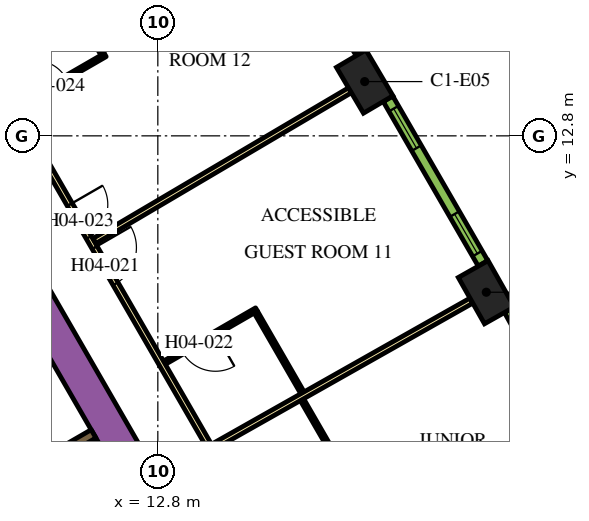
"""IFC4 building model, lengths in metres.
Left out: names, types, materials, properties, quantities, classifications, styles, units other than length and angle.
Written with IfcOpenShell. Run it as: python <this file> out.ifc"""

import sys

from ifc_helpers import new_model, si_unit, direction, frame, frame_2d, origin, origin_2d, place, context, subcontext, project, spatial, rectangle, extrude, element, fill, save


model = new_model("IFC4")
c1 = context("Model", 3, precision=1e-05, world=origin(), true_north=direction((0.0, 1.0)))
c2 = subcontext(c1, "Body", "Model", "MODEL_VIEW")
j1 = project(units=[si_unit("LENGTHUNIT", "METRE"), si_unit("PLANEANGLEUNIT", "RADIAN")], contexts=[c1])
p1 = place(None, origin())
s1 = spatial("IfcSite", under=j1, at=p1, CompositionType="ELEMENT")
p2 = place(p1, origin())
s2 = spatial("IfcBuilding", under=s1, at=p2, CompositionType="ELEMENT")
p3 = place(p2, frame((0.0, 0.0, 66.6)))
s3 = spatial("IfcBuildingStorey", under=s2, at=p3, CompositionType="ELEMENT", Elevation=66.6)
for number, where, z_axis, x_axis in (
    (1, (21.443, 8.685, 0.0), (0.0, 0.0, 1.0), (-0.492, 0.871, 0.0)),
    (2, (18.243, 14.228, 0.0), (0.0, 0.0, 1.0), (-0.508, 0.861, 0.0)),
):
    element("IfcColumn", number, at=place(p3, frame(where, z_axis=z_axis, x_axis=x_axis)), inside=s3, PredefinedType="COLUMN", context=c2, shape_type="SweptSolid", body=[
        extrude(rectangle(XDim=1.4, YDim=0.9, at=origin_2d()), origin(), (0.0, 0.0, 1.0), 3.9),
    ])
p4 = place(p3, frame((6.461, 13.909, 0.0), z_axis=(0.0, 0.0, 1.0), x_axis=(0.500005804227, -0.866022052686, 0.0)))
e3 = element("IfcWall", 3, at=p4, inside=s3, PredefinedType="SOLIDWALL", context=c2, shape_type="SweptSolid", body=[
    extrude(rectangle(XDim=20.834, YDim=0.9, at=frame_2d((10.417, 0.0))), origin(), (0.0, 0.0, 1.0), 3.9),
])
p5 = place(p3, frame((9.204, 3.859, 0.0), z_axis=(0.0, 0.0, 1.0), x_axis=(0.86605622881, 0.499946605688, 0.0)))
e4 = element("IfcWall", 4, at=p5, inside=s3, PredefinedType="SOLIDWALL", context=c2, shape_type="SweptSolid", body=[
    extrude(rectangle(XDim=2.2, YDim=0.25, at=frame_2d((1.1, 0.0))), origin(), (0.0, 0.0, 1.0), 3.9),
])
p6 = place(p3, frame((11.553, -0.46, 0.0), z_axis=(0.0, 0.0, 1.0), x_axis=(-0.500006514828, 0.866021642414, 0.0)))
e5 = element("IfcWall", 5, at=p6, inside=s3, PredefinedType="SOLIDWALL", context=c2, shape_type="SweptSolid", body=[
    extrude(rectangle(XDim=12.35, YDim=0.25, at=frame_2d((6.175, 0.0))), origin(), (0.0, 0.0, 1.0), 3.9),
])
p7 = place(p6, frame((0.585, 0.0, 0.0)))
e6 = element("IfcOpeningElement", 6, at=p7, cuts=e5, PredefinedType="OPENING", context=c2, shape_type="SweptSolid", body=[
    extrude(rectangle(XDim=1.1, YDim=2.1, at=frame_2d((0.55, 1.05))), frame((0.0, 0.135, 0.0), z_axis=(0.0, -1.0, 0.0), x_axis=(1.0, 0.0, 0.0)), (0.0, 0.0, 1.0), 0.27),
])
p8 = place(p6, frame((3.105, 0.0, 0.0)))
e7 = element("IfcOpeningElement", 7, at=p8, cuts=e5, PredefinedType="OPENING", context=c2, shape_type="SweptSolid", body=[
    extrude(rectangle(XDim=1.1, YDim=2.1, at=frame_2d((0.55, 1.05))), frame((0.0, 0.135, 0.0), z_axis=(0.0, -1.0, 0.0), x_axis=(1.0, 0.0, 0.0)), (0.0, 0.0, 1.0), 0.27),
])
p9 = place(p6, frame((5.625, 0.0, 0.0)))
e8 = element("IfcOpeningElement", 8, at=p9, cuts=e5, PredefinedType="OPENING", context=c2, shape_type="SweptSolid", body=[
    extrude(rectangle(XDim=1.1, YDim=2.1, at=frame_2d((0.55, 1.05))), frame((0.0, 0.135, 0.0), z_axis=(0.0, -1.0, 0.0), x_axis=(1.0, 0.0, 0.0)), (0.0, 0.0, 1.0), 0.27),
])
p10 = place(p3, frame((6.163, 18.475, 0.0), z_axis=(0.0, 0.0, 1.0), x_axis=(0.500001317485, -0.866024643133, 0.0)))
e9 = element("IfcWall", 9, at=p10, inside=s3, PredefinedType="PARTITIONING", context=c2, shape_type="SweptSolid", body=[
    extrude(rectangle(XDim=25.767, YDim=0.15, at=frame_2d((12.883, 0.0))), origin(), (0.0, 0.0, 1.0), 2.75),
])
p11 = place(p10, frame((21.138, 0.0, 0.0)))
e10 = element("IfcOpeningElement", 10, at=p11, cuts=e9, PredefinedType="OPENING", context=c2, shape_type="SweptSolid", body=[
    extrude(rectangle(XDim=1.0, YDim=2.1, at=frame_2d((0.5, 1.05))), frame((0.0, 0.085, 0.0), z_axis=(0.0, -1.0, 0.0), x_axis=(1.0, 0.0, 0.0)), (0.0, 0.0, 1.0), 0.17),
])
p12 = place(p10, frame((9.948, 0.0, 0.0)))
e11 = element("IfcOpeningElement", 11, at=p12, cuts=e9, PredefinedType="OPENING", context=c2, shape_type="SweptSolid", body=[
    extrude(rectangle(XDim=1.1, YDim=2.1, at=frame_2d((0.55, 1.05))), frame((0.0, 0.085, 0.0), z_axis=(0.0, -1.0, 0.0), x_axis=(1.0, 0.0, 0.0)), (0.0, 0.0, 1.0), 0.17),
])
p13 = place(p10, frame((8.641, 0.0, 0.0)))
e12 = element("IfcOpeningElement", 12, at=p13, cuts=e9, PredefinedType="OPENING", context=c2, shape_type="SweptSolid", body=[
    extrude(rectangle(XDim=1.0, YDim=2.1, at=frame_2d((0.5, 1.05))), frame((0.0, 0.085, 0.0), z_axis=(0.0, -1.0, 0.0), x_axis=(1.0, 0.0, 0.0)), (0.0, 0.0, 1.0), 0.17),
])
p14 = place(p10, frame((0.18, 0.0, 0.0)))
e13 = element("IfcOpeningElement", 13, at=p14, cuts=e9, PredefinedType="OPENING", context=c2, shape_type="SweptSolid", body=[
    extrude(rectangle(XDim=1.0, YDim=2.1, at=frame_2d((0.5, 1.05))), frame((0.0, 0.085, 0.0), z_axis=(0.0, -1.0, 0.0), x_axis=(1.0, 0.0, 0.0)), (0.0, 0.0, 1.0), 0.17),
])
p15 = place(p3, frame((17.856, 13.999, 0.0), z_axis=(0.0, 0.0, 1.0), x_axis=(-0.861371519381, -0.507975497047, 0.0)))
e14 = element("IfcWall", 14, at=p15, inside=s3, PredefinedType="PARTITIONING", context=c2, shape_type="SweptSolid", body=[
    extrude(rectangle(XDim=7.804, YDim=0.15, at=frame_2d((3.902, 0.0))), origin(), (0.0, 0.0, 1.0), 2.75),
])
p16 = place(p3, frame((21.052, 8.464, 0.0), z_axis=(0.0, 0.0, 1.0), x_axis=(-0.87059371954, -0.492002617368, 0.0)))
e15 = element("IfcWall", 15, at=p16, inside=s3, PredefinedType="PARTITIONING", context=c2, shape_type="SweptSolid", body=[
    extrude(rectangle(XDim=7.803, YDim=0.15, at=frame_2d((3.902, 0.0))), origin(), (0.0, 0.0, 1.0), 2.75),
])
p17 = place(p3, frame((17.646, 4.036, 0.0), z_axis=(0.0, 0.0, 1.0), x_axis=(-0.500027713859, 0.866009402589, 0.0)))
e16 = element("IfcWall", 16, at=p17, inside=s3, PredefinedType="PARTITIONING", context=c2, shape_type="SweptSolid", body=[
    extrude(rectangle(XDim=2.1, YDim=0.1, at=frame_2d((1.05, 0.0))), origin(), (0.0, 0.0, 1.0), 2.75),
])
p18 = place(p3, frame((15.397, 8.231, 0.0), z_axis=(0.0, 0.0, 1.0), x_axis=(-0.866018616679, -0.500011755427, 0.0)))
e17 = element("IfcWall", 17, at=p18, inside=s3, PredefinedType="PARTITIONING", context=c2, shape_type="SweptSolid", body=[
    extrude(rectangle(XDim=2.8, YDim=0.1, at=frame_2d((1.4, 0.0))), origin(), (0.0, 0.0, 1.0), 2.75),
])
p19 = place(p18, frame((1.25, 0.0, 0.0)))
e18 = element("IfcOpeningElement", 18, at=p19, cuts=e17, PredefinedType="OPENING", context=c2, shape_type="SweptSolid", body=[
    extrude(rectangle(XDim=1.0, YDim=2.1, at=frame_2d((0.5, 1.05))), frame((0.0, 0.06, 0.0), z_axis=(0.0, -1.0, 0.0), x_axis=(1.0, 0.0, 0.0)), (0.0, 0.0, 1.0), 0.12),
])
p20 = place(p3, frame((15.379, 8.163, 0.0), z_axis=(0.0, 0.0, 1.0), x_axis=(0.499987006516, -0.866032905446, 0.0)))
e19 = element("IfcWall", 19, at=p20, inside=s3, PredefinedType="PARTITIONING", context=c2, shape_type="SweptSolid", body=[
    extrude(rectangle(XDim=2.45, YDim=0.1, at=frame_2d((1.225, 0.0))), origin(), (0.0, 0.0, 1.0), 2.75),
])
p21 = place(p3, frame((9.077, 13.578, 0.0), z_axis=(0.0, 0.0, 1.0), x_axis=(0.866036505625, 0.499980770555, 0.0)))
e20 = element("IfcWall", 20, at=p21, inside=s3, PredefinedType="PARTITIONING", context=c2, shape_type="SweptSolid", body=[
    extrude(rectangle(XDim=2.7, YDim=0.1, at=frame_2d((1.35, 0.0))), origin(), (0.0, 0.0, 1.0), 2.75),
])
p22 = place(p21, frame((0.6, 0.0, 0.0)))
e21 = element("IfcOpeningElement", 21, at=p22, cuts=e20, PredefinedType="OPENING", context=c2, shape_type="SweptSolid", body=[
    extrude(rectangle(XDim=0.9, YDim=2.1, at=frame_2d((0.45, 1.05))), frame((0.0, 0.06, 0.0), z_axis=(0.0, -1.0, 0.0), x_axis=(1.0, 0.0, 0.0)), (0.0, 0.0, 1.0), 0.12),
])
p23 = place(p3, frame((11.342, 14.955, 0.0), z_axis=(0.0, 0.0, 1.0), x_axis=(-0.500008976872, 0.866020220923, 0.0)))
e22 = element("IfcWall", 22, at=p23, inside=s3, PredefinedType="PARTITIONING", context=c2, shape_type="SweptSolid", body=[
    extrude(rectangle(XDim=2.09, YDim=0.1, at=frame_2d((1.045, 0.0))), origin(), (0.0, 0.0, 1.0), 2.75),
])
p24 = place(p3, frame((24.468, 3.846, 0.0), z_axis=(0.0, 0.0, 1.0), x_axis=(-0.483912572871, 0.875116347589, 0.0)))
e23 = element("IfcWall", 23, at=p24, inside=s3, PredefinedType="SOLIDWALL", context=c2, shape_type="SweptSolid", body=[
    extrude(rectangle(XDim=4.998, YDim=0.29, at=frame_2d((2.499, 0.0))), origin(), (0.0, 0.0, 1.0), 3.65),
])
p25 = place(p24, frame((0.297, 0.0, 0.9)))
e24 = element("IfcOpeningElement", 24, at=p25, cuts=e23, PredefinedType="OPENING", context=c2, shape_type="SweptSolid", body=[
    extrude(rectangle(XDim=1.2, YDim=2.15, at=frame_2d((0.6, 1.075))), frame((0.0, 0.155, 0.0), z_axis=(0.0, -1.0, 0.0), x_axis=(1.0, 0.0, 0.0)), (0.0, 0.0, 1.0), 0.31),
])
p26 = place(p24, frame((3.501, 0.0, 0.9)))
e25 = element("IfcOpeningElement", 25, at=p26, cuts=e23, PredefinedType="OPENING", context=c2, shape_type="SweptSolid", body=[
    extrude(rectangle(XDim=1.2, YDim=2.15, at=frame_2d((0.6, 1.075))), frame((0.0, 0.155, 0.0), z_axis=(0.0, -1.0, 0.0), x_axis=(1.0, 0.0, 0.0)), (0.0, 0.0, 1.0), 0.31),
])
p27 = place(p3, frame((21.357, 9.445, 0.0), z_axis=(0.0, 0.0, 1.0), x_axis=(-0.50002123722, 0.866013142123, 0.0)))
e26 = element("IfcWall", 26, at=p27, inside=s3, PredefinedType="SOLIDWALL", context=c2, shape_type="SweptSolid", body=[
    extrude(rectangle(XDim=4.998, YDim=0.29, at=frame_2d((2.499, 0.0))), origin(), (0.0, 0.0, 1.0), 3.65),
])
p28 = place(p27, frame((0.297, 0.0, 0.9)))
e27 = element("IfcOpeningElement", 27, at=p28, cuts=e26, PredefinedType="OPENING", context=c2, shape_type="SweptSolid", body=[
    extrude(rectangle(XDim=1.2, YDim=2.15, at=frame_2d((0.6, 1.075))), frame((0.0, 0.155, 0.0), z_axis=(0.0, -1.0, 0.0), x_axis=(1.0, 0.0, 0.0)), (0.0, 0.0, 1.0), 0.31),
])
p29 = place(p27, frame((3.501, 0.0, 0.9)))
e28 = element("IfcOpeningElement", 28, at=p29, cuts=e26, PredefinedType="OPENING", context=c2, shape_type="SweptSolid", body=[
    extrude(rectangle(XDim=1.2, YDim=2.15, at=frame_2d((0.6, 1.075))), frame((0.0, 0.155, 0.0), z_axis=(0.0, -1.0, 0.0), x_axis=(1.0, 0.0, 0.0)), (0.0, 0.0, 1.0), 0.31),
])
p30 = place(p3, frame((18.143, 14.986, 0.0), z_axis=(0.0, 0.0, 1.0), x_axis=(-0.515938796285, 0.856625448191, 0.0)))
e29 = element("IfcWall", 29, at=p30, inside=s3, PredefinedType="SOLIDWALL", context=c2, shape_type="SweptSolid", body=[
    extrude(rectangle(XDim=4.998, YDim=0.29, at=frame_2d((2.499, 0.0))), origin(), (0.0, 0.0, 1.0), 3.65),
])
p31 = place(p30, frame((0.297, 0.0, 0.9)))
e30 = element("IfcOpeningElement", 30, at=p31, cuts=e29, PredefinedType="OPENING", context=c2, shape_type="SweptSolid", body=[
    extrude(rectangle(XDim=1.2, YDim=2.15, at=frame_2d((0.6, 1.075))), frame((0.0, 0.155, 0.0), z_axis=(0.0, -1.0, 0.0), x_axis=(1.0, 0.0, 0.0)), (0.0, 0.0, 1.0), 0.31),
])
p32 = place(p30, frame((3.501, 0.0, 0.9)))
e31 = element("IfcOpeningElement", 31, at=p32, cuts=e29, PredefinedType="OPENING", context=c2, shape_type="SweptSolid", body=[
    extrude(rectangle(XDim=1.2, YDim=2.15, at=frame_2d((0.6, 1.075))), frame((0.0, 0.155, 0.0), z_axis=(0.0, -1.0, 0.0), x_axis=(1.0, 0.0, 0.0)), (0.0, 0.0, 1.0), 0.31),
])
p33 = place(p12, origin())
e32 = element("IfcDoor", 32, at=p33, inside=s3, OperationType="SINGLE_SWING_LEFT", PredefinedType="DOOR", context=c2, shape_type="SweptSolid", body=[
    extrude(rectangle(XDim=1.1, YDim=2.1, at=frame_2d((0.55, 1.05))), frame((0.0, 0.025, 0.0), z_axis=(0.0, -1.0, 0.0), x_axis=(1.0, 0.0, 0.0)), (0.0, 0.0, 1.0), 0.05),
])
fill(e11, e32)
p34 = place(p19, origin())
e33 = element("IfcDoor", 33, at=p34, inside=s3, OperationType="SINGLE_SWING_LEFT", PredefinedType="DOOR", context=c2, shape_type="SweptSolid", body=[
    extrude(rectangle(XDim=1.0, YDim=2.1, at=frame_2d((0.5, 1.05))), frame((0.0, 0.025, 0.0), z_axis=(0.0, -1.0, 0.0), x_axis=(1.0, 0.0, 0.0)), (0.0, 0.0, 1.0), 0.05),
])
fill(e18, e33)
p35 = place(p13, origin())
e34 = element("IfcDoor", 34, at=p35, inside=s3, OperationType="SINGLE_SWING_RIGHT", PredefinedType="DOOR", context=c2, shape_type="SweptSolid", body=[
    extrude(rectangle(XDim=1.0, YDim=2.1, at=frame_2d((0.5, 1.05))), frame((0.0, 0.025, 0.0), z_axis=(0.0, -1.0, 0.0), x_axis=(1.0, 0.0, 0.0)), (0.0, 0.0, 1.0), 0.05),
])
fill(e12, e34)
p36 = place(p22, origin())
e35 = element("IfcDoor", 35, at=p36, inside=s3, OperationType="SINGLE_SWING_RIGHT", PredefinedType="DOOR", context=c2, shape_type="SweptSolid", body=[
    extrude(rectangle(XDim=0.9, YDim=2.1, at=frame_2d((0.45, 1.05))), frame((0.0, 0.025, 0.0), z_axis=(0.0, -1.0, 0.0), x_axis=(1.0, 0.0, 0.0)), (0.0, 0.0, 1.0), 0.05),
])
fill(e21, e35)
p37 = place(p28, origin())
e36 = element("IfcWindow", 36, at=p37, inside=s3, PartitioningType="DOUBLE_PANEL_VERTICAL", PredefinedType="WINDOW", context=c2, shape_type="SweptSolid", body=[
    extrude(rectangle(XDim=1.2, YDim=2.15, at=frame_2d((0.6, 1.075))), frame((0.0, 0.015, 0.0), z_axis=(0.0, -1.0, 0.0), x_axis=(1.0, 0.0, 0.0)), (0.0, 0.0, 1.0), 0.06),
])
fill(e27, e36)
p38 = place(p29, origin())
e37 = element("IfcWindow", 37, at=p38, inside=s3, PartitioningType="DOUBLE_PANEL_VERTICAL", PredefinedType="WINDOW", context=c2, shape_type="SweptSolid", body=[
    extrude(rectangle(XDim=1.2, YDim=2.15, at=frame_2d((0.6, 1.075))), frame((0.0, 0.015, 0.0), z_axis=(0.0, -1.0, 0.0), x_axis=(1.0, 0.0, 0.0)), (0.0, 0.0, 1.0), 0.06),
])
fill(e28, e37)
save(model, sys.argv[1])
